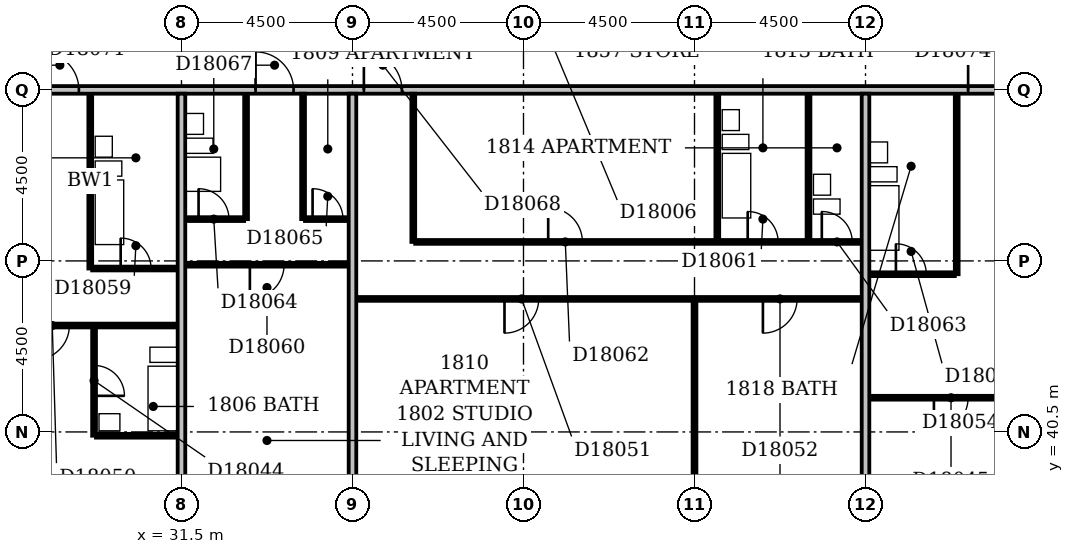
"""IFC4 building model, lengths in metres.
Left out: names, types, materials, properties, quantities, classifications, styles, units other than length and angle.
Written with IfcOpenShell. Run it as: python <this file> out.ifc"""

import sys

from ifc_helpers import new_model, si_unit, direction, frame, frame_2d, origin, place, context, subcontext, project, spatial, rectangle, extrude, element, fill, save


model = new_model("IFC4")
c1 = context("Model", 3, precision=1e-05, world=origin(), true_north=direction((0.0, 1.0)))
c2 = subcontext(c1, "Body", "Model", "MODEL_VIEW")
j1 = project(units=[si_unit("LENGTHUNIT", "METRE"), si_unit("PLANEANGLEUNIT", "RADIAN")], contexts=[c1])
p1 = place(None, origin())
s1 = spatial("IfcSite", under=j1, at=p1, CompositionType="ELEMENT")
p2 = place(p1, origin())
s2 = spatial("IfcBuilding", under=s1, at=p2, CompositionType="ELEMENT")
p3 = place(p2, frame((0.0, 0.0, 75.8)))
s3 = spatial("IfcBuildingStorey", under=s2, at=p3, CompositionType="ELEMENT", Elevation=75.8)
p4 = place(p3, frame((31.5, 36.6, 0.0), z_axis=(0.0, 0.0, 1.0), x_axis=(0.0, 1.0, 0.0)))
e1 = element("IfcWall", 1, at=p4, inside=s3, PredefinedType="PARTITIONING", context=c2, shape_type="SweptSolid", body=[
    extrude(rectangle(XDim=12.8, YDim=0.2, at=frame_2d((6.4, 0.0))), origin(), (0.0, 0.0, 1.0), 3.3),
])
p5 = place(p3, frame((36.0, 36.6, 0.0), z_axis=(0.0, 0.0, 1.0), x_axis=(0.0, 1.0, 0.0)))
e2 = element("IfcWall", 2, at=p5, inside=s3, PredefinedType="PARTITIONING", context=c2, shape_type="SweptSolid", body=[
    extrude(rectangle(XDim=12.8, YDim=0.2, at=frame_2d((6.4, 0.0))), origin(), (0.0, 0.0, 1.0), 2.4),
])
p6 = place(p3, frame((45.0, 36.6, 0.0), z_axis=(0.0, 0.0, 1.0), x_axis=(0.0, 1.0, 0.0)))
e3 = element("IfcWall", 3, at=p6, inside=s3, PredefinedType="PARTITIONING", context=c2, shape_type="SweptSolid", body=[
    extrude(rectangle(XDim=7.35, YDim=0.1, at=frame_2d((3.675, 0.0))), origin(), (0.0, 0.0, 1.0), 2.6),
])
p7 = place(p3, frame((49.5, 36.6, 0.0), z_axis=(0.0, 0.0, 1.0), x_axis=(0.0, 1.0, 0.0)))
e4 = element("IfcWall", 4, at=p7, inside=s3, PredefinedType="PARTITIONING", context=c2, shape_type="SweptSolid", body=[
    extrude(rectangle(XDim=12.8, YDim=0.2, at=frame_2d((6.4, 0.0))), origin(), (0.0, 0.0, 1.0), 3.3),
])
p8 = place(p3, frame((29.2, 40.4, 0.0), z_axis=(0.0, 0.0, 1.0), x_axis=(0.0, 1.0, 0.0)))
e5 = element("IfcWall", 5, at=p8, inside=s3, PredefinedType="PLUMBINGWALL", context=c2, shape_type="SweptSolid", body=[
    extrude(rectangle(XDim=2.85, YDim=0.1, at=frame_2d((1.425, 0.0))), origin(), (0.0, 0.0, 1.0), 3.3),
])
p9 = place(p8, frame((1.05, 0.0, 0.0)))
e6 = element("IfcOpeningElement", 6, at=p9, cuts=e5, PredefinedType="OPENING", context=c2, shape_type="SweptSolid", body=[
    extrude(rectangle(XDim=0.8, YDim=2.1, at=frame_2d((0.4, 1.05))), frame((0.0, 0.062, 0.0), z_axis=(0.0, -1.0, 0.0), x_axis=(1.0, 0.0, 0.0)), (0.0, 0.0, 1.0), 0.124),
])
p10 = place(p3, frame((29.25, 40.4, 0.0), z_axis=(0.0, 0.0, 1.0), x_axis=(1.0, 0.0, 0.0)))
e7 = element("IfcWall", 7, at=p10, inside=s3, PredefinedType="PLUMBINGWALL", context=c2, shape_type="SweptSolid", body=[
    extrude(rectangle(XDim=2.15, YDim=0.1, at=frame_2d((1.075, 0.0))), origin(), (0.0, 0.0, 1.0), 3.3),
])
p11 = place(p3, frame((49.6, 41.4, 0.0), z_axis=(0.0, 0.0, 1.0), x_axis=(1.0, 0.0, 0.0)))
e8 = element("IfcWall", 8, at=p11, inside=s3, PredefinedType="PARTITIONING", context=c2, shape_type="SweptSolid", body=[
    extrude(rectangle(XDim=18.5, YDim=0.1, at=frame_2d((9.25, 0.0))), origin(), (0.0, 0.0, 1.0), 3.3),
])
p12 = place(p11, frame((1.7, 0.0, 0.0)))
e9 = element("IfcOpeningElement", 9, at=p12, cuts=e8, PredefinedType="OPENING", context=c2, shape_type="SweptSolid", body=[
    extrude(rectangle(XDim=0.9, YDim=2.1, at=frame_2d((0.45, 1.05))), frame((0.0, 0.062, 0.0), z_axis=(0.0, -1.0, 0.0), x_axis=(1.0, 0.0, 0.0)), (0.0, 0.0, 1.0), 0.124),
])
p13 = place(p11, frame((6.2, 0.0, 0.0)))
e10 = element("IfcOpeningElement", 10, at=p13, cuts=e8, PredefinedType="OPENING", context=c2, shape_type="SweptSolid", body=[
    extrude(rectangle(XDim=0.9, YDim=2.1, at=frame_2d((0.45, 1.05))), frame((0.0, 0.062, 0.0), z_axis=(0.0, -1.0, 0.0), x_axis=(1.0, 0.0, 0.0)), (0.0, 0.0, 1.0), 0.124),
])
p14 = place(p11, frame((11.85, 0.0, 0.0)))
e11 = element("IfcOpeningElement", 11, at=p14, cuts=e8, PredefinedType="OPENING", context=c2, shape_type="SweptSolid", body=[
    extrude(rectangle(XDim=0.9, YDim=2.1, at=frame_2d((0.45, 1.05))), frame((0.0, 0.062, 0.0), z_axis=(0.0, -1.0, 0.0), x_axis=(1.0, 0.0, 0.0)), (0.0, 0.0, 1.0), 0.124),
])
p15 = place(p11, frame((15.2, 0.0, 0.0)))
e12 = element("IfcOpeningElement", 12, at=p15, cuts=e8, PredefinedType="OPENING", context=c2, shape_type="SweptSolid", body=[
    extrude(rectangle(XDim=0.9, YDim=2.1, at=frame_2d((0.45, 1.05))), frame((0.0, 0.062, 0.0), z_axis=(0.0, -1.0, 0.0), x_axis=(1.0, 0.0, 0.0)), (0.0, 0.0, 1.0), 0.124),
])
p16 = place(p3, frame((22.6, 43.3, 0.0), z_axis=(0.0, 0.0, 1.0), x_axis=(1.0, 0.0, 0.0)))
e13 = element("IfcWall", 13, at=p16, inside=s3, PredefinedType="PARTITIONING", context=c2, shape_type="SweptSolid", body=[
    extrude(rectangle(XDim=8.8, YDim=0.1, at=frame_2d((4.4, 0.0))), origin(), (0.0, 0.0, 1.0), 3.3),
])
p17 = place(p16, frame((1.7, 0.0, 0.0)))
e14 = element("IfcOpeningElement", 14, at=p17, cuts=e13, PredefinedType="OPENING", context=c2, shape_type="SweptSolid", body=[
    extrude(rectangle(XDim=0.9, YDim=2.1, at=frame_2d((0.45, 1.05))), frame((0.0, 0.062, 0.0), z_axis=(0.0, -1.0, 0.0), x_axis=(1.0, 0.0, 0.0)), (0.0, 0.0, 1.0), 0.124),
])
p18 = place(p16, frame((5.05, 0.0, 0.0)))
e15 = element("IfcOpeningElement", 15, at=p18, cuts=e13, PredefinedType="OPENING", context=c2, shape_type="SweptSolid", body=[
    extrude(rectangle(XDim=0.9, YDim=2.1, at=frame_2d((0.45, 1.05))), frame((0.0, 0.062, 0.0), z_axis=(0.0, -1.0, 0.0), x_axis=(1.0, 0.0, 0.0)), (0.0, 0.0, 1.0), 0.124),
])
p19 = place(p3, frame((36.1, 44.0, 0.0), z_axis=(0.0, 0.0, 1.0), x_axis=(1.0, 0.0, 0.0)))
e16 = element("IfcWall", 16, at=p19, inside=s3, PredefinedType="PARTITIONING", context=c2, shape_type="SweptSolid", body=[
    extrude(rectangle(XDim=13.3, YDim=0.1, at=frame_2d((6.65, 0.0))), origin(), (0.0, 0.0, 1.0), 3.3),
])
p20 = place(p19, frame((3.9, 0.0, 0.0)))
e17 = element("IfcOpeningElement", 17, at=p20, cuts=e16, PredefinedType="OPENING", context=c2, shape_type="SweptSolid", body=[
    extrude(rectangle(XDim=0.9, YDim=2.1, at=frame_2d((0.45, 1.05))), frame((0.0, 0.062, 0.0), z_axis=(0.0, -1.0, 0.0), x_axis=(1.0, 0.0, 0.0)), (0.0, 0.0, 1.0), 0.124),
])
p21 = place(p19, frame((10.7, 0.0, 0.0)))
e18 = element("IfcOpeningElement", 18, at=p21, cuts=e16, PredefinedType="OPENING", context=c2, shape_type="SweptSolid", body=[
    extrude(rectangle(XDim=0.9, YDim=2.1, at=frame_2d((0.45, 1.05))), frame((0.0, 0.062, 0.0), z_axis=(0.0, -1.0, 0.0), x_axis=(1.0, 0.0, 0.0)), (0.0, 0.0, 1.0), 0.124),
])
p22 = place(p3, frame((49.6, 44.65, 0.0), z_axis=(0.0, 0.0, 1.0), x_axis=(1.0, 0.0, 0.0)))
e19 = element("IfcWall", 19, at=p22, inside=s3, PredefinedType="PARTITIONING", context=c2, shape_type="SweptSolid", body=[
    extrude(rectangle(XDim=2.25, YDim=0.1, at=frame_2d((1.125, 0.0))), origin(), (0.0, 0.0, 1.0), 3.3),
])
p23 = place(p22, frame((0.7, 0.0, 0.0)))
e20 = element("IfcOpeningElement", 20, at=p23, cuts=e19, PredefinedType="OPENING", context=c2, shape_type="SweptSolid", body=[
    extrude(rectangle(XDim=0.8, YDim=2.1, at=frame_2d((0.4, 1.05))), frame((0.0, 0.062, 0.0), z_axis=(0.0, -1.0, 0.0), x_axis=(1.0, 0.0, 0.0)), (0.0, 0.0, 1.0), 0.124),
])
p24 = place(p3, frame((51.9, 44.65, 0.0), z_axis=(0.0, 0.0, 1.0), x_axis=(0.0, 1.0, 0.0)))
e21 = element("IfcWall", 21, at=p24, inside=s3, PredefinedType="PLUMBINGWALL", context=c2, shape_type="SweptSolid", body=[
    extrude(rectangle(XDim=4.75, YDim=0.1, at=frame_2d((2.375, 0.0))), origin(), (0.0, 0.0, 1.0), 3.3),
])
p25 = place(p3, frame((29.1, 44.8, 0.0), z_axis=(0.0, 0.0, 1.0), x_axis=(0.0, 1.0, 0.0)))
e22 = element("IfcWall", 22, at=p25, inside=s3, PredefinedType="PLUMBINGWALL", context=c2, shape_type="SweptSolid", body=[
    extrude(rectangle(XDim=4.6, YDim=0.1, at=frame_2d((2.3, 0.0))), origin(), (0.0, 0.0, 1.0), 3.3),
])
p26 = place(p3, frame((29.15, 44.8, 0.0), z_axis=(0.0, 0.0, 1.0), x_axis=(1.0, 0.0, 0.0)))
e23 = element("IfcWall", 23, at=p26, inside=s3, PredefinedType="PARTITIONING", context=c2, shape_type="SweptSolid", body=[
    extrude(rectangle(XDim=2.25, YDim=0.1, at=frame_2d((1.125, 0.0))), origin(), (0.0, 0.0, 1.0), 3.3),
])
p27 = place(p26, frame((0.75, 0.0, 0.0)))
e24 = element("IfcOpeningElement", 24, at=p27, cuts=e23, PredefinedType="OPENING", context=c2, shape_type="SweptSolid", body=[
    extrude(rectangle(XDim=0.8, YDim=2.1, at=frame_2d((0.4, 1.05))), frame((0.0, 0.062, 0.0), z_axis=(0.0, -1.0, 0.0), x_axis=(1.0, 0.0, 0.0)), (0.0, 0.0, 1.0), 0.124),
])
p28 = place(p3, frame((31.6, 44.9, 0.0), z_axis=(0.0, 0.0, 1.0), x_axis=(1.0, 0.0, 0.0)))
e25 = element("IfcWall", 25, at=p28, inside=s3, PredefinedType="PARTITIONING", context=c2, shape_type="SweptSolid", body=[
    extrude(rectangle(XDim=4.3, YDim=0.1, at=frame_2d((2.15, 0.0))), origin(), (0.0, 0.0, 1.0), 3.3),
])
p29 = place(p28, frame((1.7, 0.0, 0.0)))
e26 = element("IfcOpeningElement", 26, at=p29, cuts=e25, PredefinedType="OPENING", context=c2, shape_type="SweptSolid", body=[
    extrude(rectangle(XDim=0.9, YDim=2.1, at=frame_2d((0.45, 1.05))), frame((0.0, 0.062, 0.0), z_axis=(0.0, -1.0, 0.0), x_axis=(1.0, 0.0, 0.0)), (0.0, 0.0, 1.0), 0.124),
])
p30 = place(p3, frame((37.6, 45.5, 0.0), z_axis=(0.0, 0.0, 1.0), x_axis=(0.0, 1.0, 0.0)))
e27 = element("IfcWall", 27, at=p30, inside=s3, PredefinedType="PARTITIONING", context=c2, shape_type="SweptSolid", body=[
    extrude(rectangle(XDim=3.9, YDim=0.1, at=frame_2d((1.95, 0.0))), origin(), (0.0, 0.0, 1.0), 3.3),
])
p31 = place(p3, frame((37.65, 45.5, 0.0), z_axis=(0.0, 0.0, 1.0), x_axis=(1.0, 0.0, 0.0)))
e28 = element("IfcWall", 28, at=p31, inside=s3, PredefinedType="PARTITIONING", context=c2, shape_type="SweptSolid", body=[
    extrude(rectangle(XDim=11.75, YDim=0.1, at=frame_2d((5.875, 0.0))), origin(), (0.0, 0.0, 1.0), 3.3),
])
p32 = place(p31, frame((8.75, 0.0, 0.0)))
e29 = element("IfcOpeningElement", 29, at=p32, cuts=e28, PredefinedType="OPENING", context=c2, shape_type="SweptSolid", body=[
    extrude(rectangle(XDim=0.8, YDim=2.1, at=frame_2d((0.4, 1.05))), frame((0.0, 0.062, 0.0), z_axis=(0.0, -1.0, 0.0), x_axis=(1.0, 0.0, 0.0)), (0.0, 0.0, 1.0), 0.124),
])
p33 = place(p31, frame((3.5, 0.0, 0.0)))
e30 = element("IfcOpeningElement", 30, at=p33, cuts=e28, PredefinedType="OPENING", context=c2, shape_type="SweptSolid", body=[
    extrude(rectangle(XDim=0.9, YDim=2.1, at=frame_2d((0.45, 1.05))), frame((0.0, 0.062, 0.0), z_axis=(0.0, -1.0, 0.0), x_axis=(1.0, 0.0, 0.0)), (0.0, 0.0, 1.0), 0.124),
])
p34 = place(p31, frame((10.7, 0.0, 0.0)))
e31 = element("IfcOpeningElement", 31, at=p34, cuts=e28, PredefinedType="OPENING", context=c2, shape_type="SweptSolid", body=[
    extrude(rectangle(XDim=0.8, YDim=2.1, at=frame_2d((0.4, 1.05))), frame((0.0, 0.062, 0.0), z_axis=(0.0, -1.0, 0.0), x_axis=(1.0, 0.0, 0.0)), (0.0, 0.0, 1.0), 0.124),
])
p35 = place(p3, frame((45.6, 45.55, 0.0), z_axis=(0.0, 0.0, 1.0), x_axis=(0.0, 1.0, 0.0)))
e32 = element("IfcWall", 32, at=p35, inside=s3, PredefinedType="PLUMBINGWALL", context=c2, shape_type="SweptSolid", body=[
    extrude(rectangle(XDim=3.85, YDim=0.1, at=frame_2d((1.925, 0.0))), origin(), (0.0, 0.0, 1.0), 2.6),
])
p36 = place(p3, frame((48.0, 45.55, 0.0), z_axis=(0.0, 0.0, 1.0), x_axis=(0.0, 1.0, 0.0)))
e33 = element("IfcWall", 33, at=p36, inside=s3, PredefinedType="PLUMBINGWALL", context=c2, shape_type="SweptSolid", body=[
    extrude(rectangle(XDim=3.85, YDim=0.1, at=frame_2d((1.925, 0.0))), origin(), (0.0, 0.0, 1.0), 3.3),
])
p37 = place(p3, frame((31.6, 46.1, 0.0), z_axis=(0.0, 0.0, 1.0), x_axis=(1.0, 0.0, 0.0)))
e34 = element("IfcWall", 34, at=p37, inside=s3, PredefinedType="PARTITIONING", context=c2, shape_type="SweptSolid", body=[
    extrude(rectangle(XDim=1.55, YDim=0.1, at=frame_2d((0.775, 0.0))), origin(), (0.0, 0.0, 1.0), 3.3),
])
p38 = place(p37, frame((0.35, 0.0, 0.0)))
e35 = element("IfcOpeningElement", 35, at=p38, cuts=e34, PredefinedType="OPENING", context=c2, shape_type="SweptSolid", body=[
    extrude(rectangle(XDim=0.8, YDim=2.1, at=frame_2d((0.4, 1.05))), frame((0.0, 0.062, 0.0), z_axis=(0.0, -1.0, 0.0), x_axis=(1.0, 0.0, 0.0)), (0.0, 0.0, 1.0), 0.124),
])
p39 = place(p3, frame((33.2, 46.1, 0.0), z_axis=(0.0, 0.0, 1.0), x_axis=(0.0, 1.0, 0.0)))
e36 = element("IfcWall", 36, at=p39, inside=s3, PredefinedType="PLUMBINGWALL", context=c2, shape_type="SweptSolid", body=[
    extrude(rectangle(XDim=3.3, YDim=0.1, at=frame_2d((1.65, 0.0))), origin(), (0.0, 0.0, 1.0), 3.3),
])
p40 = place(p3, frame((34.7, 46.1, 0.0), z_axis=(0.0, 0.0, 1.0), x_axis=(0.0, 1.0, 0.0)))
e37 = element("IfcWall", 37, at=p40, inside=s3, PredefinedType="PARTITIONING", context=c2, shape_type="SweptSolid", body=[
    extrude(rectangle(XDim=3.3, YDim=0.1, at=frame_2d((1.65, 0.0))), origin(), (0.0, 0.0, 1.0), 3.3),
])
p41 = place(p3, frame((34.75, 46.1, 0.0), z_axis=(0.0, 0.0, 1.0), x_axis=(1.0, 0.0, 0.0)))
e38 = element("IfcWall", 38, at=p41, inside=s3, PredefinedType="PARTITIONING", context=c2, shape_type="SweptSolid", body=[
    extrude(rectangle(XDim=1.15, YDim=0.1, at=frame_2d((0.575, 0.0))), origin(), (0.0, 0.0, 1.0), 3.3),
])
p42 = place(p41, frame((0.2, 0.0, 0.0)))
e39 = element("IfcOpeningElement", 39, at=p42, cuts=e38, PredefinedType="OPENING", context=c2, shape_type="SweptSolid", body=[
    extrude(rectangle(XDim=0.8, YDim=2.1, at=frame_2d((0.4, 1.05))), frame((0.0, 0.062, 0.0), z_axis=(0.0, -1.0, 0.0), x_axis=(1.0, 0.0, 0.0)), (0.0, 0.0, 1.0), 0.124),
])
p43 = place(p3, frame((9.1, 49.5, 0.0), z_axis=(0.0, 0.0, 1.0), x_axis=(1.0, 0.0, 0.0)))
e40 = element("IfcWall", 40, at=p43, inside=s3, PredefinedType="PARTITIONING", context=c2, shape_type="SweptSolid", body=[
    extrude(rectangle(XDim=57.8, YDim=0.2, at=frame_2d((28.9, 0.0))), origin(), (0.0, 0.0, 1.0), 3.3),
])
p44 = place(p43, frame((18.7, 0.0, 0.0)))
e41 = element("IfcOpeningElement", 41, at=p44, cuts=e40, PredefinedType="OPENING", context=c2, shape_type="SweptSolid", body=[
    extrude(rectangle(XDim=1.0, YDim=2.1, at=frame_2d((0.5, 1.05))), frame((0.0, 0.112, 0.0), z_axis=(0.0, -1.0, 0.0), x_axis=(1.0, 0.0, 0.0)), (0.0, 0.0, 1.0), 0.224),
])
p45 = place(p43, frame((24.35, 0.0, 0.0)))
e42 = element("IfcOpeningElement", 42, at=p45, cuts=e40, PredefinedType="OPENING", context=c2, shape_type="SweptSolid", body=[
    extrude(rectangle(XDim=1.0, YDim=2.1, at=frame_2d((0.5, 1.05))), frame((0.0, 0.112, 0.0), z_axis=(0.0, -1.0, 0.0), x_axis=(1.0, 0.0, 0.0)), (0.0, 0.0, 1.0), 0.224),
])
p46 = place(p43, frame((27.2, 0.0, 0.0)))
e43 = element("IfcOpeningElement", 43, at=p46, cuts=e40, PredefinedType="OPENING", context=c2, shape_type="SweptSolid", body=[
    extrude(rectangle(XDim=1.0, YDim=2.1, at=frame_2d((0.5, 1.05))), frame((0.0, 0.112, 0.0), z_axis=(0.0, -1.0, 0.0), x_axis=(1.0, 0.0, 0.0)), (0.0, 0.0, 1.0), 0.224),
])
p47 = place(p43, frame((43.1, 0.0, 0.0)))
e44 = element("IfcOpeningElement", 44, at=p47, cuts=e40, PredefinedType="OPENING", context=c2, shape_type="SweptSolid", body=[
    extrude(rectangle(XDim=1.0, YDim=2.1, at=frame_2d((0.5, 1.05))), frame((0.0, 0.112, 0.0), z_axis=(0.0, -1.0, 0.0), x_axis=(1.0, 0.0, 0.0)), (0.0, 0.0, 1.0), 0.224),
])
p48 = place(p43, frame((3.9, 0.0, 0.0)))
e45 = element("IfcOpeningElement", 45, at=p48, cuts=e40, PredefinedType="OPENING", context=c2, shape_type="SweptSolid", body=[
    extrude(rectangle(XDim=0.9, YDim=2.1, at=frame_2d((0.45, 1.05))), frame((0.0, 0.112, 0.0), z_axis=(0.0, -1.0, 0.0), x_axis=(1.0, 0.0, 0.0)), (0.0, 0.0, 1.0), 0.224),
])
p49 = place(p9, frame((0.8, 0.0, 0.0), z_axis=(0.0, 0.0, 1.0), x_axis=(-1.0, 0.0, 0.0)))
e46 = element("IfcDoor", 46, at=p49, inside=s3, OperationType="SINGLE_SWING_RIGHT", PredefinedType="DOOR", context=c2, shape_type="SweptSolid", body=[
    extrude(rectangle(XDim=0.8, YDim=2.1, at=frame_2d((0.4, 1.05))), frame((0.0, 0.025, 0.0), z_axis=(0.0, -1.0, 0.0), x_axis=(1.0, 0.0, 0.0)), (0.0, 0.0, 1.0), 0.05),
])
fill(e6, e46)
p50 = place(p12, frame((0.9, 0.0, 0.0), z_axis=(0.0, 0.0, 1.0), x_axis=(-1.0, 0.0, 0.0)))
e47 = element("IfcDoor", 47, at=p50, inside=s3, OperationType="SINGLE_SWING_RIGHT", PredefinedType="DOOR", context=c2, shape_type="SweptSolid", body=[
    extrude(rectangle(XDim=0.9, YDim=2.1, at=frame_2d((0.45, 1.05))), frame((0.0, 0.025, 0.0), z_axis=(0.0, -1.0, 0.0), x_axis=(1.0, 0.0, 0.0)), (0.0, 0.0, 1.0), 0.05),
])
fill(e9, e47)
p51 = place(p18, frame((0.9, 0.0, 0.0), z_axis=(0.0, 0.0, 1.0), x_axis=(-1.0, 0.0, 0.0)))
e48 = element("IfcDoor", 48, at=p51, inside=s3, OperationType="SINGLE_SWING_RIGHT", PredefinedType="DOOR", context=c2, shape_type="SweptSolid", body=[
    extrude(rectangle(XDim=0.9, YDim=2.1, at=frame_2d((0.45, 1.05))), frame((0.0, 0.025, 0.0), z_axis=(0.0, -1.0, 0.0), x_axis=(1.0, 0.0, 0.0)), (0.0, 0.0, 1.0), 0.05),
])
fill(e15, e48)
p52 = place(p20, frame((0.9, 0.0, 0.0), z_axis=(0.0, 0.0, 1.0), x_axis=(-1.0, 0.0, 0.0)))
e49 = element("IfcDoor", 49, at=p52, inside=s3, OperationType="SINGLE_SWING_RIGHT", PredefinedType="DOOR", context=c2, shape_type="SweptSolid", body=[
    extrude(rectangle(XDim=0.9, YDim=2.1, at=frame_2d((0.45, 1.05))), frame((0.0, 0.025, 0.0), z_axis=(0.0, -1.0, 0.0), x_axis=(1.0, 0.0, 0.0)), (0.0, 0.0, 1.0), 0.05),
])
fill(e17, e49)
p53 = place(p21, frame((0.9, 0.0, 0.0), z_axis=(0.0, 0.0, 1.0), x_axis=(-1.0, 0.0, 0.0)))
e50 = element("IfcDoor", 50, at=p53, inside=s3, OperationType="SINGLE_SWING_RIGHT", PredefinedType="DOOR", context=c2, shape_type="SweptSolid", body=[
    extrude(rectangle(XDim=0.9, YDim=2.1, at=frame_2d((0.45, 1.05))), frame((0.0, 0.025, 0.0), z_axis=(0.0, -1.0, 0.0), x_axis=(1.0, 0.0, 0.0)), (0.0, 0.0, 1.0), 0.05),
])
fill(e18, e50)
p54 = place(p23, origin())
e51 = element("IfcDoor", 51, at=p54, inside=s3, OperationType="SINGLE_SWING_LEFT", PredefinedType="DOOR", context=c2, shape_type="SweptSolid", body=[
    extrude(rectangle(XDim=0.8, YDim=2.1, at=frame_2d((0.4, 1.05))), frame((0.0, 0.025, 0.0), z_axis=(0.0, -1.0, 0.0), x_axis=(1.0, 0.0, 0.0)), (0.0, 0.0, 1.0), 0.05),
])
fill(e20, e51)
p55 = place(p27, origin())
e52 = element("IfcDoor", 52, at=p55, inside=s3, OperationType="SINGLE_SWING_LEFT", PredefinedType="DOOR", context=c2, shape_type="SweptSolid", body=[
    extrude(rectangle(XDim=0.8, YDim=2.1, at=frame_2d((0.4, 1.05))), frame((0.0, 0.025, 0.0), z_axis=(0.0, -1.0, 0.0), x_axis=(1.0, 0.0, 0.0)), (0.0, 0.0, 1.0), 0.05),
])
fill(e24, e52)
p56 = place(p29, frame((0.9, 0.0, 0.0), z_axis=(0.0, 0.0, 1.0), x_axis=(-1.0, 0.0, 0.0)))
e53 = element("IfcDoor", 53, at=p56, inside=s3, OperationType="SINGLE_SWING_RIGHT", PredefinedType="DOOR", context=c2, shape_type="SweptSolid", body=[
    extrude(rectangle(XDim=0.9, YDim=2.1, at=frame_2d((0.45, 1.05))), frame((0.0, 0.025, 0.0), z_axis=(0.0, -1.0, 0.0), x_axis=(1.0, 0.0, 0.0)), (0.0, 0.0, 1.0), 0.05),
])
fill(e26, e53)
p57 = place(p32, origin())
e54 = element("IfcDoor", 54, at=p57, inside=s3, OperationType="SINGLE_SWING_LEFT", PredefinedType="DOOR", context=c2, shape_type="SweptSolid", body=[
    extrude(rectangle(XDim=0.8, YDim=2.1, at=frame_2d((0.4, 1.05))), frame((0.0, 0.025, 0.0), z_axis=(0.0, -1.0, 0.0), x_axis=(1.0, 0.0, 0.0)), (0.0, 0.0, 1.0), 0.05),
])
fill(e29, e54)
p58 = place(p33, origin())
e55 = element("IfcDoor", 55, at=p58, inside=s3, OperationType="SINGLE_SWING_LEFT", PredefinedType="DOOR", context=c2, shape_type="SweptSolid", body=[
    extrude(rectangle(XDim=0.9, YDim=2.1, at=frame_2d((0.45, 1.05))), frame((0.0, 0.025, 0.0), z_axis=(0.0, -1.0, 0.0), x_axis=(1.0, 0.0, 0.0)), (0.0, 0.0, 1.0), 0.05),
])
fill(e30, e55)
p59 = place(p34, origin())
e56 = element("IfcDoor", 56, at=p59, inside=s3, OperationType="SINGLE_SWING_LEFT", PredefinedType="DOOR", context=c2, shape_type="SweptSolid", body=[
    extrude(rectangle(XDim=0.8, YDim=2.1, at=frame_2d((0.4, 1.05))), frame((0.0, 0.025, 0.0), z_axis=(0.0, -1.0, 0.0), x_axis=(1.0, 0.0, 0.0)), (0.0, 0.0, 1.0), 0.05),
])
fill(e31, e56)
p60 = place(p38, origin())
e57 = element("IfcDoor", 57, at=p60, inside=s3, OperationType="SINGLE_SWING_LEFT", PredefinedType="DOOR", context=c2, shape_type="SweptSolid", body=[
    extrude(rectangle(XDim=0.8, YDim=2.1, at=frame_2d((0.4, 1.05))), frame((0.0, 0.025, 0.0), z_axis=(0.0, -1.0, 0.0), x_axis=(1.0, 0.0, 0.0)), (0.0, 0.0, 1.0), 0.05),
])
fill(e35, e57)
p61 = place(p42, origin())
e58 = element("IfcDoor", 58, at=p61, inside=s3, OperationType="SINGLE_SWING_LEFT", PredefinedType="DOOR", context=c2, shape_type="SweptSolid", body=[
    extrude(rectangle(XDim=0.8, YDim=2.1, at=frame_2d((0.4, 1.05))), frame((0.0, 0.025, 0.0), z_axis=(0.0, -1.0, 0.0), x_axis=(1.0, 0.0, 0.0)), (0.0, 0.0, 1.0), 0.05),
])
fill(e39, e58)
p62 = place(p44, origin())
e59 = element("IfcDoor", 59, at=p62, inside=s3, OperationType="SINGLE_SWING_LEFT", PredefinedType="DOOR", context=c2, shape_type="SweptSolid", body=[
    extrude(rectangle(XDim=1.0, YDim=2.1, at=frame_2d((0.5, 1.05))), frame((0.0, 0.025, 0.0), z_axis=(0.0, -1.0, 0.0), x_axis=(1.0, 0.0, 0.0)), (0.0, 0.0, 1.0), 0.05),
])
fill(e41, e59)
p63 = place(p45, origin())
e60 = element("IfcDoor", 60, at=p63, inside=s3, OperationType="SINGLE_SWING_LEFT", PredefinedType="DOOR", context=c2, shape_type="SweptSolid", body=[
    extrude(rectangle(XDim=1.0, YDim=2.1, at=frame_2d((0.5, 1.05))), frame((0.0, 0.025, 0.0), z_axis=(0.0, -1.0, 0.0), x_axis=(1.0, 0.0, 0.0)), (0.0, 0.0, 1.0), 0.05),
])
fill(e42, e60)
p64 = place(p46, origin())
e61 = element("IfcDoor", 61, at=p64, inside=s3, OperationType="SINGLE_SWING_LEFT", PredefinedType="DOOR", context=c2, shape_type="SweptSolid", body=[
    extrude(rectangle(XDim=1.0, YDim=2.1, at=frame_2d((0.5, 1.05))), frame((0.0, 0.025, 0.0), z_axis=(0.0, -1.0, 0.0), x_axis=(1.0, 0.0, 0.0)), (0.0, 0.0, 1.0), 0.05),
])
fill(e43, e61)
p65 = place(p47, origin())
e62 = element("IfcDoor", 62, at=p65, inside=s3, OperationType="SINGLE_SWING_LEFT", PredefinedType="DOOR", context=c2, shape_type="SweptSolid", body=[
    extrude(rectangle(XDim=1.0, YDim=2.1, at=frame_2d((0.5, 1.05))), frame((0.0, 0.025, 0.0), z_axis=(0.0, -1.0, 0.0), x_axis=(1.0, 0.0, 0.0)), (0.0, 0.0, 1.0), 0.05),
])
fill(e44, e62)
save(model, sys.argv[1])
